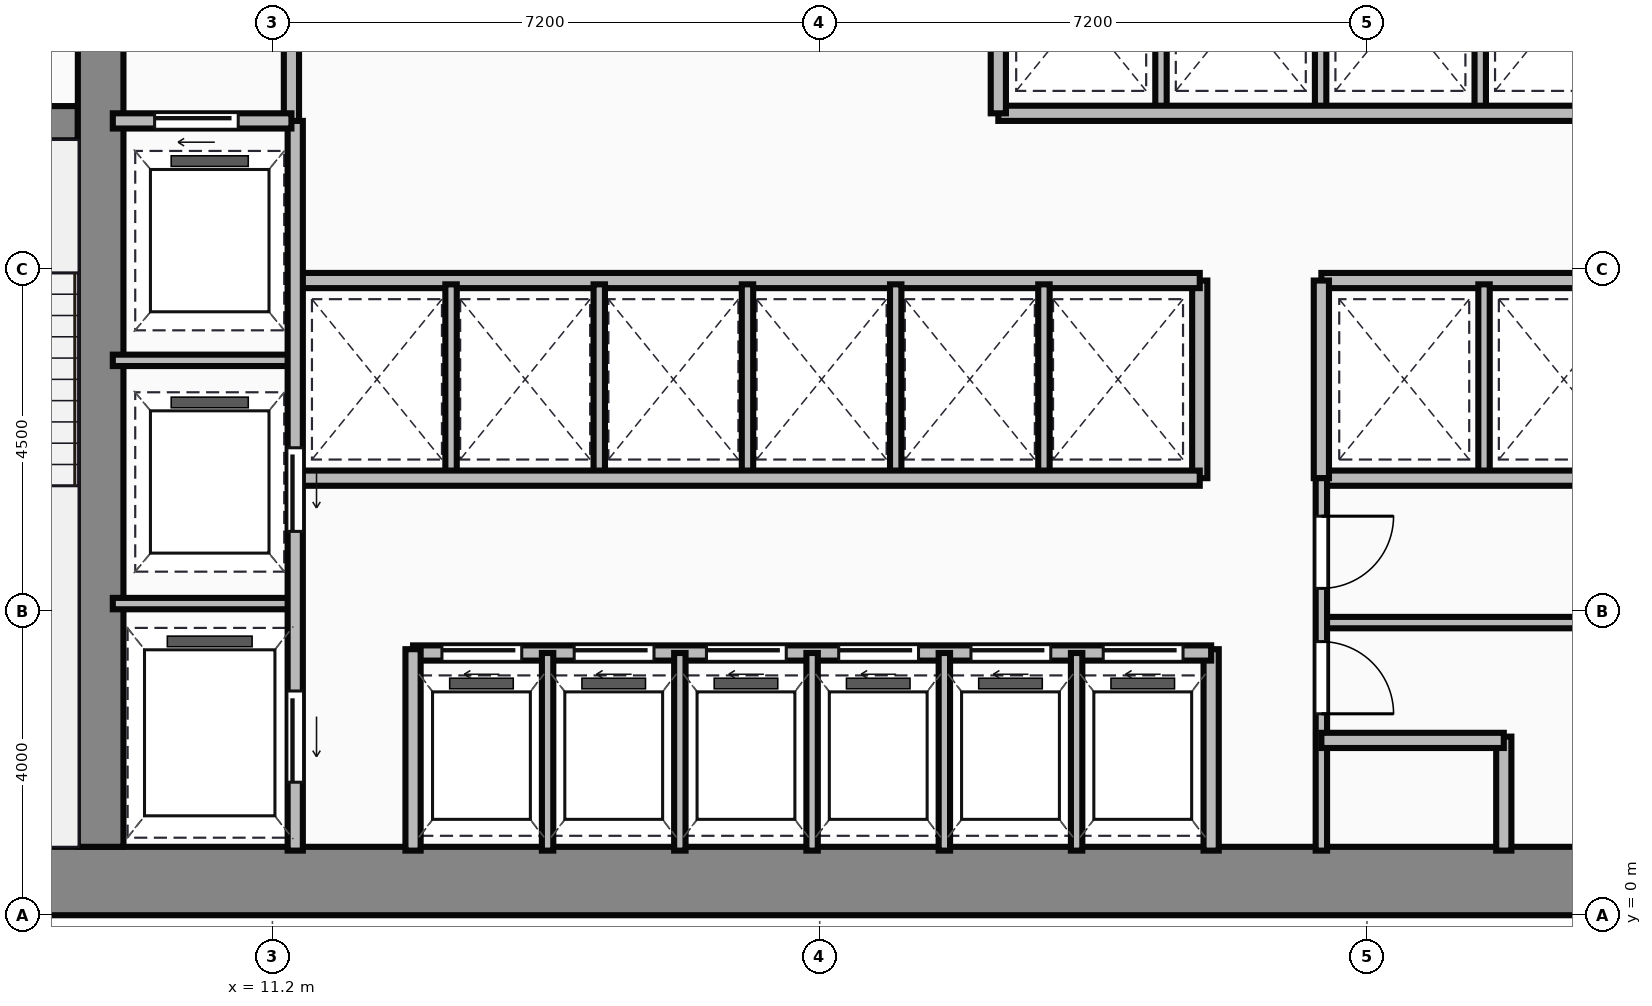
"""IFC4 building model, lengths in metres.
Left out: names, types, materials, properties, quantities, classifications, styles, units other than length and angle.
Written with IfcOpenShell. Run it as: python <this file> out.ifc"""

import sys

from ifc_helpers import new_model, si_unit, direction, frame, frame_2d, origin, place, context, subcontext, project, spatial, rectangle, extrude, source, transform, mapped, element, fill, save


model = new_model("IFC4")
c1 = context("Model", 3, precision=1e-05, world=origin(), true_north=direction((0.0, 1.0)))
c2 = subcontext(c1, "Body", "Model", "MODEL_VIEW")
j1 = project(units=[si_unit("LENGTHUNIT", "METRE"), si_unit("PLANEANGLEUNIT", "RADIAN")], contexts=[c1])
p1 = place(None, origin())
s1 = spatial("IfcSite", under=j1, at=p1, CompositionType="ELEMENT")
p2 = place(p1, origin())
s2 = spatial("IfcBuilding", under=s1, at=p2, CompositionType="ELEMENT")
p3 = place(p2, frame((0.0, 0.0, 32.5)))
s3 = spatial("IfcBuildingStorey", under=s2, at=p3, CompositionType="ELEMENT", Elevation=32.5)
m1 = source(origin(), c2, "Body", "SweptSolid", [
    extrude(rectangle(XDim=29.5, YDim=0.9, at=frame_2d((14.75, 0.0))), origin(), (0.0, 0.0, 1.0), 3.65),
])
p4 = place(p3, frame((4.5, 0.45, 0.0), z_axis=(0.0, 0.0, 1.0), x_axis=(1.0, 0.0, 0.0)))
e1 = element("IfcWall", 1, at=p4, inside=s3, PredefinedType="SHEAR", context=c2, shape_type="MappedRepresentation", body=[
    mapped(m1, transform((0.0, 0.0, 0.0))),
])
m2 = source(origin(), c2, "Body", "SweptSolid", [
    extrude(rectangle(XDim=12.2, YDim=0.6, at=frame_2d((6.1, 0.0))), origin(), (0.0, 0.0, 1.0), 3.65),
])
p5 = place(p3, frame((8.94, 0.9, 0.0), z_axis=(0.0, 0.0, 1.0), x_axis=(0.0, 1.0, 0.0)))
e2 = element("IfcWall", 2, at=p5, inside=s3, PredefinedType="SHEAR", context=c2, shape_type="MappedRepresentation", body=[
    mapped(m2, transform((0.0, 0.0, 0.0))),
])
m3 = source(origin(), c2, "Body", "SweptSolid", [
    extrude(rectangle(XDim=3.39, YDim=0.45, at=frame_2d((1.695, 0.0))), origin(), (0.0, 0.0, 1.0), 3.65),
])
p6 = place(p3, frame((5.25, 10.42, 0.0), z_axis=(0.0, 0.0, 1.0), x_axis=(1.0, 0.0, 0.0)))
e3 = element("IfcWall", 3, at=p6, inside=s3, PredefinedType="SHEAR", context=c2, shape_type="MappedRepresentation", body=[
    mapped(m3, transform((0.0, 0.0, 0.0))),
])
p7 = place(p6, frame((1.05, 0.0, 0.0)))
e4 = element("IfcOpeningElement", 4, at=p7, cuts=e3, PredefinedType="OPENING", context=c2, shape_type="SweptSolid", body=[
    extrude(rectangle(XDim=1.1, YDim=2.15, at=frame_2d((0.55, 1.075))), frame((0.0, 0.235, 0.0), z_axis=(0.0, -1.0, 0.0), x_axis=(1.0, 0.0, 0.0)), (0.0, 0.0, 1.0), 0.47),
])
m4 = source(origin(), c2, "Body", "SweptSolid", [
    extrude(rectangle(XDim=3.18, YDim=0.2, at=frame_2d((1.59, 0.0))), origin(), (0.0, 0.0, 1.0), 3.4),
])
p8 = place(p3, frame((11.45, 10.42, 0.0), z_axis=(0.0, 0.0, 1.0), x_axis=(0.0, 1.0, 0.0)))
e5 = element("IfcWall", 5, at=p8, inside=s3, PredefinedType="PARTITIONING", context=c2, shape_type="MappedRepresentation", body=[
    mapped(m4, transform((0.0, 0.0, 0.0))),
])
m5 = source(origin(), c2, "Body", "SweptSolid", [
    extrude(rectangle(XDim=2.35, YDim=0.2, at=frame_2d((1.175, 0.0))), origin(), (0.0, 0.0, 1.0), 3.4),
])
p9 = place(p3, frame((9.1, 10.45, 0.0), z_axis=(0.0, 0.0, 1.0), x_axis=(1.0, 0.0, 0.0)))
e6 = element("IfcWall", 6, at=p9, inside=s3, PredefinedType="PARTITIONING", context=c2, shape_type="MappedRepresentation", body=[
    mapped(m5, transform((0.0, 0.0, 0.0))),
])
p10 = place(p9, frame((0.55, 0.0, 0.0)))
e7 = element("IfcOpeningElement", 7, at=p10, cuts=e6, PredefinedType="OPENING", context=c2, shape_type="SweptSolid", body=[
    extrude(rectangle(XDim=1.1, YDim=2.15, at=frame_2d((0.55, 1.075))), frame((0.0, 0.11, 0.0), z_axis=(0.0, -1.0, 0.0), x_axis=(1.0, 0.0, 0.0)), (0.0, 0.0, 1.0), 0.22),
])
m6 = source(origin(), c2, "Body", "SweptSolid", [
    extrude(rectangle(XDim=9.6, YDim=0.2, at=frame_2d((4.8, 0.0))), origin(), (0.0, 0.0, 1.0), 3.4),
])
p11 = place(p3, frame((11.5, 0.85, 0.0), z_axis=(0.0, 0.0, 1.0), x_axis=(0.0, 1.0, 0.0)))
e8 = element("IfcWall", 8, at=p11, inside=s3, PredefinedType="PARTITIONING", context=c2, shape_type="MappedRepresentation", body=[
    mapped(m6, transform((0.0, 0.0, 0.0))),
])
p12 = place(p11, frame((4.2, 0.0, 0.0)))
e9 = element("IfcOpeningElement", 9, at=p12, cuts=e8, PredefinedType="OPENING", context=c2, shape_type="SweptSolid", body=[
    extrude(rectangle(XDim=1.1, YDim=2.15, at=frame_2d((0.55, 1.075))), frame((0.0, 0.11, 0.0), z_axis=(0.0, -1.0, 0.0), x_axis=(1.0, 0.0, 0.0)), (0.0, 0.0, 1.0), 0.22),
])
p13 = place(p11, frame((0.9, 0.0, 0.0)))
e10 = element("IfcOpeningElement", 10, at=p13, cuts=e8, PredefinedType="OPENING", context=c2, shape_type="SweptSolid", body=[
    extrude(rectangle(XDim=1.2, YDim=2.15, at=frame_2d((0.6, 1.075))), frame((0.0, 0.11, 0.0), z_axis=(0.0, -1.0, 0.0), x_axis=(1.0, 0.0, 0.0)), (0.0, 0.0, 1.0), 0.22),
])
m7 = source(origin(), c2, "Body", "SweptSolid", [
    extrude(rectangle(XDim=2.4, YDim=0.15, at=frame_2d((1.2, 0.0))), origin(), (0.0, 0.0, 1.0), 3.4),
])
for number, where, z_axis, x_axis in (
    (11, (9.1, 4.1, 0.0), (0.0, 0.0, 1.0), (1.0, 0.0, 0.0)),
    (12, (9.1, 7.3, 0.0), (0.0, 0.0, 1.0), (1.0, 0.0, 0.0)),
):
    element("IfcWall", number, at=place(p3, frame(where, z_axis=z_axis, x_axis=x_axis)), inside=s3, PredefinedType="PARTITIONING", context=c2, shape_type="MappedRepresentation", body=[
        mapped(m7, transform((0.0, 0.0, 0.0))),
    ])
m8 = source(origin(), c2, "Body", "SweptSolid", [
    extrude(rectangle(XDim=2.65, YDim=0.2, at=frame_2d((1.325, 0.0))), origin(), (0.0, 0.0, 1.0), 3.4),
])
p14 = place(p3, frame((13.05, 0.85, 0.0), z_axis=(0.0, 0.0, 1.0), x_axis=(0.0, 1.0, 0.0)))
e13 = element("IfcWall", 13, at=p14, inside=s3, PredefinedType="PARTITIONING", context=c2, shape_type="MappedRepresentation", body=[
    mapped(m8, transform((0.0, 0.0, 0.0))),
])
m9 = source(origin(), c2, "Body", "SweptSolid", [
    extrude(rectangle(XDim=10.5, YDim=0.2, at=frame_2d((5.25, 0.0))), origin(), (0.0, 0.0, 1.0), 3.4),
])
p15 = place(p3, frame((13.05, 3.45, 0.0), z_axis=(0.0, 0.0, 1.0), x_axis=(1.0, 0.0, 0.0)))
e14 = element("IfcWall", 14, at=p15, inside=s3, PredefinedType="PARTITIONING", context=c2, shape_type="MappedRepresentation", body=[
    mapped(m9, transform((0.0, 0.0, 0.0))),
])
p16 = place(p15, frame((0.38, 0.0, 0.0)))
e15 = element("IfcOpeningElement", 15, at=p16, cuts=e14, PredefinedType="OPENING", context=c2, shape_type="SweptSolid", body=[
    extrude(rectangle(XDim=1.05, YDim=2.15, at=frame_2d((0.525, 1.075))), frame((0.0, 0.11, 0.0), z_axis=(0.0, -1.0, 0.0), x_axis=(1.0, 0.0, 0.0)), (0.0, 0.0, 1.0), 0.22),
])
p17 = place(p15, frame((2.12, 0.0, 0.0)))
e16 = element("IfcOpeningElement", 16, at=p17, cuts=e14, PredefinedType="OPENING", context=c2, shape_type="SweptSolid", body=[
    extrude(rectangle(XDim=1.05, YDim=2.15, at=frame_2d((0.525, 1.075))), frame((0.0, 0.11, 0.0), z_axis=(0.0, -1.0, 0.0), x_axis=(1.0, 0.0, 0.0)), (0.0, 0.0, 1.0), 0.22),
])
p18 = place(p15, frame((3.86, 0.0, 0.0)))
e17 = element("IfcOpeningElement", 17, at=p18, cuts=e14, PredefinedType="OPENING", context=c2, shape_type="SweptSolid", body=[
    extrude(rectangle(XDim=1.05, YDim=2.15, at=frame_2d((0.525, 1.075))), frame((0.0, 0.11, 0.0), z_axis=(0.0, -1.0, 0.0), x_axis=(1.0, 0.0, 0.0)), (0.0, 0.0, 1.0), 0.22),
])
p19 = place(p15, frame((5.6, 0.0, 0.0)))
e18 = element("IfcOpeningElement", 18, at=p19, cuts=e14, PredefinedType="OPENING", context=c2, shape_type="SweptSolid", body=[
    extrude(rectangle(XDim=1.05, YDim=2.15, at=frame_2d((0.525, 1.075))), frame((0.0, 0.11, 0.0), z_axis=(0.0, -1.0, 0.0), x_axis=(1.0, 0.0, 0.0)), (0.0, 0.0, 1.0), 0.22),
])
p20 = place(p15, frame((7.34, 0.0, 0.0)))
e19 = element("IfcOpeningElement", 19, at=p20, cuts=e14, PredefinedType="OPENING", context=c2, shape_type="SweptSolid", body=[
    extrude(rectangle(XDim=1.05, YDim=2.15, at=frame_2d((0.525, 1.075))), frame((0.0, 0.11, 0.0), z_axis=(0.0, -1.0, 0.0), x_axis=(1.0, 0.0, 0.0)), (0.0, 0.0, 1.0), 0.22),
])
p21 = place(p15, frame((9.08, 0.0, 0.0)))
e20 = element("IfcOpeningElement", 20, at=p21, cuts=e14, PredefinedType="OPENING", context=c2, shape_type="SweptSolid", body=[
    extrude(rectangle(XDim=1.05, YDim=2.15, at=frame_2d((0.525, 1.075))), frame((0.0, 0.11, 0.0), z_axis=(0.0, -1.0, 0.0), x_axis=(1.0, 0.0, 0.0)), (0.0, 0.0, 1.0), 0.22),
])
p22 = place(p3, frame((23.55, 0.85, 0.0), z_axis=(0.0, 0.0, 1.0), x_axis=(0.0, 1.0, 0.0)))
e21 = element("IfcWall", 21, at=p22, inside=s3, PredefinedType="PARTITIONING", context=c2, shape_type="MappedRepresentation", body=[
    mapped(m8, transform((0.0, 0.0, 0.0))),
])
m10 = source(origin(), c2, "Body", "SweptSolid", [
    extrude(rectangle(XDim=2.6, YDim=0.15, at=frame_2d((1.3, 0.0))), origin(), (0.0, 0.0, 1.0), 3.4),
])
for number, where, z_axis, x_axis in (
    (22, (14.82, 0.85, 0.0), (0.0, 0.0, 1.0), (0.0, 1.0, 0.0)),
    (23, (16.56, 0.85, 0.0), (0.0, 0.0, 1.0), (0.0, 1.0, 0.0)),
    (24, (18.3, 0.85, 0.0), (0.0, 0.0, 1.0), (0.0, 1.0, 0.0)),
    (25, (20.04, 0.85, 0.0), (0.0, 0.0, 1.0), (0.0, 1.0, 0.0)),
    (26, (21.78, 0.85, 0.0), (0.0, 0.0, 1.0), (0.0, 1.0, 0.0)),
):
    element("IfcWall", number, at=place(p3, frame(where, z_axis=z_axis, x_axis=x_axis)), inside=s3, PredefinedType="PARTITIONING", context=c2, shape_type="MappedRepresentation", body=[
        mapped(m10, transform((0.0, 0.0, 0.0))),
    ])
m11 = source(origin(), c2, "Body", "SweptSolid", [
    extrude(rectangle(XDim=11.85, YDim=0.2, at=frame_2d((5.925, 0.0))), origin(), (0.0, 0.0, 1.0), 3.4),
])
for number, where, z_axis, x_axis in (
    (27, (11.55, 5.75, 0.0), (0.0, 0.0, 1.0), (1.0, 0.0, 0.0)),
    (28, (11.55, 8.35, 0.0), (0.0, 0.0, 1.0), (1.0, 0.0, 0.0)),
):
    element("IfcWall", number, at=place(p3, frame(where, z_axis=z_axis, x_axis=x_axis)), inside=s3, PredefinedType="PARTITIONING", context=c2, shape_type="MappedRepresentation", body=[
        mapped(m11, transform((0.0, 0.0, 0.0))),
    ])
m12 = source(origin(), c2, "Body", "SweptSolid", [
    extrude(rectangle(XDim=2.6, YDim=0.2, at=frame_2d((1.3, 0.0))), origin(), (0.0, 0.0, 1.0), 3.4),
])
p23 = place(p3, frame((23.4, 5.75, 0.0), z_axis=(0.0, 0.0, 1.0), x_axis=(0.0, 1.0, 0.0)))
e29 = element("IfcWall", 29, at=p23, inside=s3, PredefinedType="PARTITIONING", context=c2, shape_type="MappedRepresentation", body=[
    mapped(m12, transform((0.0, 0.0, 0.0))),
])
m13 = source(origin(), c2, "Body", "SweptSolid", [
    extrude(rectangle(XDim=2.5, YDim=0.15, at=frame_2d((1.25, 0.0))), origin(), (0.0, 0.0, 1.0), 3.4),
])
for number, where, z_axis, x_axis in (
    (30, (13.55, 5.8, 0.0), (0.0, 0.0, 1.0), (0.0, 1.0, 0.0)),
    (31, (15.5, 5.8, 0.0), (0.0, 0.0, 1.0), (0.0, 1.0, 0.0)),
    (32, (17.45, 5.8, 0.0), (0.0, 0.0, 1.0), (0.0, 1.0, 0.0)),
    (33, (19.4, 5.8, 0.0), (0.0, 0.0, 1.0), (0.0, 1.0, 0.0)),
    (34, (21.35, 5.8, 0.0), (0.0, 0.0, 1.0), (0.0, 1.0, 0.0)),
):
    element("IfcWall", number, at=place(p3, frame(where, z_axis=z_axis, x_axis=x_axis)), inside=s3, PredefinedType="PARTITIONING", context=c2, shape_type="MappedRepresentation", body=[
        mapped(m13, transform((0.0, 0.0, 0.0))),
    ])
m14 = source(origin(), c2, "Body", "SweptSolid", [
    extrude(rectangle(XDim=8.8, YDim=0.2, at=frame_2d((4.4, 0.0))), origin(), (0.0, 0.0, 1.0), 3.4),
])
p24 = place(p3, frame((20.75, 10.55, 0.0), z_axis=(0.0, 0.0, 1.0), x_axis=(1.0, 0.0, 0.0)))
e35 = element("IfcWall", 35, at=p24, inside=s3, PredefinedType="PARTITIONING", context=c2, shape_type="MappedRepresentation", body=[
    mapped(m14, transform((0.0, 0.0, 0.0))),
])
m15 = source(origin(), c2, "Body", "SweptSolid", [
    extrude(rectangle(XDim=3.0, YDim=0.2, at=frame_2d((1.5, 0.0))), origin(), (0.0, 0.0, 1.0), 3.4),
])
p25 = place(p3, frame((20.75, 10.55, 0.0), z_axis=(0.0, 0.0, 1.0), x_axis=(0.0, 1.0, 0.0)))
e36 = element("IfcWall", 36, at=p25, inside=s3, PredefinedType="PARTITIONING", context=c2, shape_type="MappedRepresentation", body=[
    mapped(m15, transform((0.0, 0.0, 0.0))),
])
m16 = source(origin(), c2, "Body", "SweptSolid", [
    extrude(rectangle(XDim=2.85, YDim=0.15, at=frame_2d((1.425, 0.0))), origin(), (0.0, 0.0, 1.0), 3.4),
])
for number, where, z_axis, x_axis in (
    (37, (22.89, 10.6, 0.0), (0.0, 0.0, 1.0), (0.0, 1.0, 0.0)),
    (38, (24.99, 10.6, 0.0), (0.0, 0.0, 1.0), (0.0, 1.0, 0.0)),
    (39, (27.09, 10.6, 0.0), (0.0, 0.0, 1.0), (0.0, 1.0, 0.0)),
):
    element("IfcWall", number, at=place(p3, frame(where, z_axis=z_axis, x_axis=x_axis)), inside=s3, PredefinedType="PARTITIONING", context=c2, shape_type="MappedRepresentation", body=[
        mapped(m16, transform((0.0, 0.0, 0.0))),
    ])
m17 = source(origin(), c2, "Body", "SweptSolid", [
    extrude(rectangle(XDim=4.55, YDim=0.2, at=frame_2d((2.275, 0.0))), origin(), (0.0, 0.0, 1.0), 3.4),
])
for number, where, z_axis, x_axis in (
    (40, (25.0, 8.35, 0.0), (0.0, 0.0, 1.0), (1.0, 0.0, 0.0)),
    (41, (25.0, 5.75, 0.0), (0.0, 0.0, 1.0), (1.0, 0.0, 0.0)),
):
    element("IfcWall", number, at=place(p3, frame(where, z_axis=z_axis, x_axis=x_axis)), inside=s3, PredefinedType="PARTITIONING", context=c2, shape_type="MappedRepresentation", body=[
        mapped(m17, transform((0.0, 0.0, 0.0))),
    ])
p26 = place(p3, frame((25.0, 5.75, 0.0), z_axis=(0.0, 0.0, 1.0), x_axis=(0.0, 1.0, 0.0)))
e42 = element("IfcWall", 42, at=p26, inside=s3, PredefinedType="PARTITIONING", context=c2, shape_type="MappedRepresentation", body=[
    mapped(m12, transform((0.0, 0.0, 0.0))),
])
p27 = place(p3, frame((27.14, 5.8, 0.0), z_axis=(0.0, 0.0, 1.0), x_axis=(0.0, 1.0, 0.0)))
e43 = element("IfcWall", 43, at=p27, inside=s3, PredefinedType="PARTITIONING", context=c2, shape_type="MappedRepresentation", body=[
    mapped(m13, transform((0.0, 0.0, 0.0))),
])
m18 = source(origin(), c2, "Body", "SweptSolid", [
    extrude(rectangle(XDim=4.9, YDim=0.15, at=frame_2d((2.45, 0.0))), origin(), (0.0, 0.0, 1.0), 3.4),
])
p28 = place(p3, frame((25.0, 0.85, 0.0), z_axis=(0.0, 0.0, 1.0), x_axis=(0.0, 1.0, 0.0)))
e44 = element("IfcWall", 44, at=p28, inside=s3, PredefinedType="PARTITIONING", context=c2, shape_type="MappedRepresentation", body=[
    mapped(m18, transform((0.0, 0.0, 0.0))),
])
p29 = place(p28, frame((1.8, 0.0, 0.0)))
e45 = element("IfcOpeningElement", 45, at=p29, cuts=e44, PredefinedType="OPENING", context=c2, shape_type="SweptSolid", body=[
    extrude(rectangle(XDim=0.95, YDim=2.15, at=frame_2d((0.475, 1.075))), frame((0.0, 0.085, 0.0), z_axis=(0.0, -1.0, 0.0), x_axis=(1.0, 0.0, 0.0)), (0.0, 0.0, 1.0), 0.17),
])
p30 = place(p28, frame((3.45, 0.0, 0.0)))
e46 = element("IfcOpeningElement", 46, at=p30, cuts=e44, PredefinedType="OPENING", context=c2, shape_type="SweptSolid", body=[
    extrude(rectangle(XDim=0.95, YDim=2.15, at=frame_2d((0.475, 1.075))), frame((0.0, 0.085, 0.0), z_axis=(0.0, -1.0, 0.0), x_axis=(1.0, 0.0, 0.0)), (0.0, 0.0, 1.0), 0.17),
])
m19 = source(origin(), c2, "Body", "SweptSolid", [
    extrude(rectangle(XDim=2.4, YDim=0.2, at=frame_2d((1.2, 0.0))), origin(), (0.0, 0.0, 1.0), 3.4),
])
p31 = place(p3, frame((25.0, 2.3, 0.0), z_axis=(0.0, 0.0, 1.0), x_axis=(1.0, 0.0, 0.0)))
e47 = element("IfcWall", 47, at=p31, inside=s3, PredefinedType="PARTITIONING", context=c2, shape_type="MappedRepresentation", body=[
    mapped(m19, transform((0.0, 0.0, 0.0))),
])
m20 = source(origin(), c2, "Body", "SweptSolid", [
    extrude(rectangle(XDim=1.5, YDim=0.2, at=frame_2d((0.75, 0.0))), origin(), (0.0, 0.0, 1.0), 3.4),
])
p32 = place(p3, frame((27.4, 0.85, 0.0), z_axis=(0.0, 0.0, 1.0), x_axis=(0.0, 1.0, 0.0)))
e48 = element("IfcWall", 48, at=p32, inside=s3, PredefinedType="PARTITIONING", context=c2, shape_type="MappedRepresentation", body=[
    mapped(m20, transform((0.0, 0.0, 0.0))),
])
m21 = source(origin(), c2, "Body", "SweptSolid", [
    extrude(rectangle(XDim=4.55, YDim=0.15, at=frame_2d((2.275, 0.0))), origin(), (0.0, 0.0, 1.0), 3.4),
])
p33 = place(p3, frame((25.0, 3.85, 0.0), z_axis=(0.0, 0.0, 1.0), x_axis=(1.0, 0.0, 0.0)))
e49 = element("IfcWall", 49, at=p33, inside=s3, PredefinedType="PARTITIONING", context=c2, shape_type="MappedRepresentation", body=[
    mapped(m21, transform((0.0, 0.0, 0.0))),
])
m22 = source(origin(), c2, "Body", "SweptSolid", [
    extrude(rectangle(XDim=1.1, YDim=2.15, at=frame_2d((0.55, 1.075))), frame((0.0, 0.025, 0.0), z_axis=(0.0, -1.0, 0.0), x_axis=(1.0, 0.0, 0.0)), (0.0, 0.0, 1.0), 0.05),
])
p34 = place(p10, origin())
e50 = element("IfcDoor", 50, at=p34, inside=s3, OperationType="SLIDING_TO_LEFT", PredefinedType="DOOR", context=c2, shape_type="MappedRepresentation", body=[
    mapped(m22, transform((0.0, 0.0, 0.0))),
])
fill(e7, e50)
p35 = place(p12, frame((1.1, 0.0, 0.0), z_axis=(0.0, 0.0, 1.0), x_axis=(-1.0, 0.0, 0.0)))
e51 = element("IfcDoor", 51, at=p35, inside=s3, OperationType="SLIDING_TO_LEFT", PredefinedType="DOOR", context=c2, shape_type="MappedRepresentation", body=[
    mapped(m22, transform((0.0, 0.0, 0.0))),
])
fill(e9, e51)
m23 = source(origin(), c2, "Body", "SweptSolid", [
    extrude(rectangle(XDim=1.2, YDim=2.15, at=frame_2d((0.6, 1.075))), frame((0.0, 0.025, 0.0), z_axis=(0.0, -1.0, 0.0), x_axis=(1.0, 0.0, 0.0)), (0.0, 0.0, 1.0), 0.05),
])
p36 = place(p13, frame((1.2, 0.0, 0.0), z_axis=(0.0, 0.0, 1.0), x_axis=(-1.0, 0.0, 0.0)))
e52 = element("IfcDoor", 52, at=p36, inside=s3, OperationType="SLIDING_TO_LEFT", PredefinedType="DOOR", context=c2, shape_type="MappedRepresentation", body=[
    mapped(m23, transform((0.0, 0.0, 0.0))),
])
fill(e10, e52)
m24 = source(origin(), c2, "Body", "SweptSolid", [
    extrude(rectangle(XDim=1.05, YDim=2.15, at=frame_2d((0.525, 1.075))), frame((0.0, 0.025, 0.0), z_axis=(0.0, -1.0, 0.0), x_axis=(1.0, 0.0, 0.0)), (0.0, 0.0, 1.0), 0.05),
])
p37 = place(p16, origin())
e53 = element("IfcDoor", 53, at=p37, inside=s3, OperationType="SLIDING_TO_LEFT", PredefinedType="DOOR", context=c2, shape_type="MappedRepresentation", body=[
    mapped(m24, transform((0.0, 0.0, 0.0))),
])
fill(e15, e53)
p38 = place(p17, origin())
e54 = element("IfcDoor", 54, at=p38, inside=s3, OperationType="SLIDING_TO_LEFT", PredefinedType="DOOR", context=c2, shape_type="MappedRepresentation", body=[
    mapped(m24, transform((0.0, 0.0, 0.0))),
])
fill(e16, e54)
p39 = place(p18, origin())
e55 = element("IfcDoor", 55, at=p39, inside=s3, OperationType="SLIDING_TO_LEFT", PredefinedType="DOOR", context=c2, shape_type="MappedRepresentation", body=[
    mapped(m24, transform((0.0, 0.0, 0.0))),
])
fill(e17, e55)
p40 = place(p19, origin())
e56 = element("IfcDoor", 56, at=p40, inside=s3, OperationType="SLIDING_TO_LEFT", PredefinedType="DOOR", context=c2, shape_type="MappedRepresentation", body=[
    mapped(m24, transform((0.0, 0.0, 0.0))),
])
fill(e18, e56)
p41 = place(p20, origin())
e57 = element("IfcDoor", 57, at=p41, inside=s3, OperationType="SLIDING_TO_LEFT", PredefinedType="DOOR", context=c2, shape_type="MappedRepresentation", body=[
    mapped(m24, transform((0.0, 0.0, 0.0))),
])
fill(e19, e57)
p42 = place(p21, origin())
e58 = element("IfcDoor", 58, at=p42, inside=s3, OperationType="SLIDING_TO_LEFT", PredefinedType="DOOR", context=c2, shape_type="MappedRepresentation", body=[
    mapped(m24, transform((0.0, 0.0, 0.0))),
])
fill(e20, e58)
m25 = source(origin(), c2, "Body", "SweptSolid", [
    extrude(rectangle(XDim=0.95, YDim=2.15, at=frame_2d((0.475, 1.075))), frame((0.0, 0.025, 0.0), z_axis=(0.0, -1.0, 0.0), x_axis=(1.0, 0.0, 0.0)), (0.0, 0.0, 1.0), 0.05),
])
p43 = place(p29, origin())
e59 = element("IfcDoor", 59, at=p43, inside=s3, OperationType="SINGLE_SWING_LEFT", PredefinedType="DOOR", context=c2, shape_type="MappedRepresentation", body=[
    mapped(m25, transform((0.0, 0.0, 0.0))),
])
fill(e45, e59)
p44 = place(p30, origin())
e60 = element("IfcDoor", 60, at=p44, inside=s3, OperationType="SINGLE_SWING_RIGHT", PredefinedType="DOOR", context=c2, shape_type="MappedRepresentation", body=[
    mapped(m25, transform((0.0, 0.0, 0.0))),
])
fill(e46, e60)
save(model, sys.argv[1])
